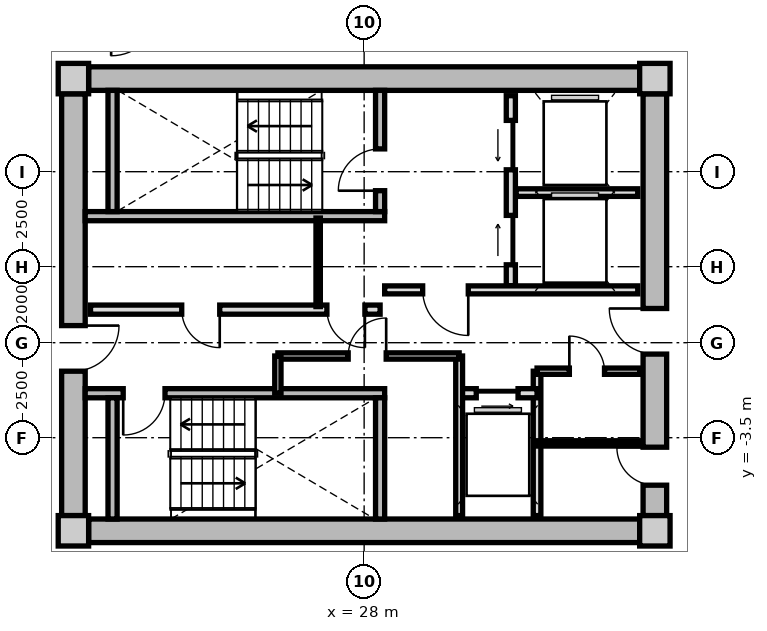
"""IFC4 building model, lengths in metres.
Left out: names, types, materials, properties, quantities, classifications, styles, units other than length and angle.
Written with IfcOpenShell. Run it as: python <this file> out.ifc"""

import sys

from ifc_helpers import new_model, si_unit, direction, frame, frame_2d, origin, origin_2d, place, context, subcontext, project, spatial, rectangle, extrude, source, transform, mapped, element, fill, save


model = new_model("IFC4")
c1 = context("Model", 3, precision=1e-05, world=origin(), true_north=direction((0.0, 1.0)))
c2 = subcontext(c1, "Body", "Model", "MODEL_VIEW")
j1 = project(units=[si_unit("LENGTHUNIT", "METRE"), si_unit("PLANEANGLEUNIT", "RADIAN")], contexts=[c1])
p1 = place(None, origin())
s1 = spatial("IfcSite", under=j1, at=p1, CompositionType="ELEMENT")
p2 = place(p1, origin())
s2 = spatial("IfcBuilding", under=s1, at=p2, CompositionType="ELEMENT")
p3 = place(p2, frame((0.0, 0.0, 167.85)))
s3 = spatial("IfcBuildingStorey", under=s2, at=p3, CompositionType="ELEMENT", Elevation=167.85)
m1 = source(origin(), c2, "Body", "SweptSolid", [
    extrude(rectangle(XDim=0.8, YDim=0.8, at=origin_2d()), origin(), (0.0, 0.0, 1.0), 3.05),
])
for number, where, z_axis, x_axis in (
    (1, (20.35, -5.95, 0.0), (0.0, 0.0, 1.0), (1.0, 0.0, 0.0)),
    (2, (35.65, -5.95, 0.0), (0.0, 0.0, 1.0), (1.0, 0.0, 0.0)),
    (3, (35.65, 5.95, 0.0), (0.0, 0.0, 1.0), (1.0, 0.0, 0.0)),
    (4, (20.35, 5.95, 0.0), (0.0, 0.0, 1.0), (1.0, 0.0, 0.0)),
):
    element("IfcColumn", number, at=place(p3, frame(where, z_axis=z_axis, x_axis=x_axis)), inside=s3, PredefinedType="COLUMN", context=c2, shape_type="MappedRepresentation", body=[
        mapped(m1, transform((0.0, 0.0, 0.0), x_axis=(1.0, 0.0, 0.0), y_axis=(0.0, 1.0, 0.0), z_axis=(0.0, 0.0, 1.0), scale=1.0)),
    ])
m2 = source(origin(), c2, "Body", "SweptSolid", [
    extrude(rectangle(XDim=14.5, YDim=0.62, at=frame_2d((7.25, 0.0))), origin(), (0.0, 0.0, 1.0), 2.81),
])
for number, where, z_axis, x_axis in (
    (5, (20.75, 5.95, 0.0), (0.0, 0.0, 1.0), (1.0, 0.0, 0.0)),
    (6, (35.25, -5.95, 0.0), (0.0, 0.0, 1.0), (-1.0, 0.0, 0.0)),
):
    element("IfcWall", number, at=place(p3, frame(where, z_axis=z_axis, x_axis=x_axis)), inside=s3, PredefinedType="SHEAR", context=c2, shape_type="MappedRepresentation", body=[
        mapped(m2, transform((0.0, 0.0, 0.0), x_axis=(1.0, 0.0, 0.0), y_axis=(0.0, 1.0, 0.0), z_axis=(0.0, 0.0, 1.0), scale=1.0)),
    ])
m3 = source(origin(), c2, "Body", "SweptSolid", [
    extrude(rectangle(XDim=11.1, YDim=0.62, at=frame_2d((5.55, 0.0))), origin(), (0.0, 0.0, 1.0), 2.81),
])
p4 = place(p3, frame((20.35, -5.55, 0.0), z_axis=(0.0, 0.0, 1.0), x_axis=(0.0, 1.0, 0.0)))
e7 = element("IfcWall", 7, at=p4, inside=s3, PredefinedType="SHEAR", context=c2, shape_type="MappedRepresentation", body=[
    mapped(m3, transform((0.0, 0.0, 0.0), x_axis=(1.0, 0.0, 0.0), y_axis=(0.0, 1.0, 0.0), z_axis=(0.0, 0.0, 1.0), scale=1.0)),
])
p5 = place(p4, frame((3.8, 0.0, 0.0)))
e8 = element("IfcOpeningElement", 8, at=p5, cuts=e7, PredefinedType="OPENING", context=c2, shape_type="SweptSolid", body=[
    extrude(rectangle(XDim=1.2, YDim=2.15, at=frame_2d((0.6, 1.075))), frame((0.0, 0.32, 0.0), z_axis=(0.0, -1.0, 0.0), x_axis=(1.0, 0.0, 0.0)), (0.0, 0.0, 1.0), 0.64),
])
p6 = place(p3, frame((35.65, 5.55, 0.0), z_axis=(0.0, 0.0, 1.0), x_axis=(0.0, -1.0, 0.0)))
e9 = element("IfcWall", 9, at=p6, inside=s3, PredefinedType="SHEAR", context=c2, shape_type="MappedRepresentation", body=[
    mapped(m3, transform((0.0, 0.0, 0.0), x_axis=(1.0, 0.0, 0.0), y_axis=(0.0, 1.0, 0.0), z_axis=(0.0, 0.0, 1.0), scale=1.0)),
])
p7 = place(p6, frame((5.65, 0.0, 0.0)))
e10 = element("IfcOpeningElement", 10, at=p7, cuts=e9, PredefinedType="OPENING", context=c2, shape_type="SweptSolid", body=[
    extrude(rectangle(XDim=1.2, YDim=2.15, at=frame_2d((0.6, 1.075))), frame((0.0, 0.32, 0.0), z_axis=(0.0, -1.0, 0.0), x_axis=(1.0, 0.0, 0.0)), (0.0, 0.0, 1.0), 0.64),
])
p8 = place(p6, frame((9.3, 0.0, 0.0)))
e11 = element("IfcOpeningElement", 11, at=p8, cuts=e9, PredefinedType="OPENING", context=c2, shape_type="SweptSolid", body=[
    extrude(rectangle(XDim=1.0, YDim=2.1, at=frame_2d((0.5, 1.05))), frame((0.0, 0.32, 0.0), z_axis=(0.0, -1.0, 0.0), x_axis=(1.0, 0.0, 0.0)), (0.0, 0.0, 1.0), 0.64),
])
m4 = source(origin(), c2, "Body", "SweptSolid", [
    extrude(rectangle(XDim=7.88, YDim=0.24, at=frame_2d((3.94, 0.0))), origin(), (0.0, 0.0, 1.0), 2.81),
])
p9 = place(p3, frame((20.66, 2.33, 0.0), z_axis=(0.0, 0.0, 1.0), x_axis=(1.0, 0.0, 0.0)))
e12 = element("IfcWall", 12, at=p9, inside=s3, PredefinedType="PARTITIONING", context=c2, shape_type="MappedRepresentation", body=[
    mapped(m4, transform((0.0, 0.0, 0.0), x_axis=(1.0, 0.0, 0.0), y_axis=(0.0, 1.0, 0.0), z_axis=(0.0, 0.0, 1.0), scale=1.0)),
])
m5 = source(origin(), c2, "Body", "SweptSolid", [
    extrude(rectangle(XDim=3.19, YDim=0.24, at=frame_2d((1.595, 0.0))), origin(), (0.0, 0.0, 1.0), 2.81),
])
p10 = place(p3, frame((21.38, 2.45, 0.0), z_axis=(0.0, 0.0, 1.0), x_axis=(0.0, 1.0, 0.0)))
e13 = element("IfcWall", 13, at=p10, inside=s3, PredefinedType="PARTITIONING", context=c2, shape_type="MappedRepresentation", body=[
    mapped(m5, transform((0.0, 0.0, 0.0), x_axis=(1.0, 0.0, 0.0), y_axis=(0.0, 1.0, 0.0), z_axis=(0.0, 0.0, 1.0), scale=1.0)),
])
p11 = place(p3, frame((28.42, 2.45, 0.0), z_axis=(0.0, 0.0, 1.0), x_axis=(0.0, 1.0, 0.0)))
e14 = element("IfcWall", 14, at=p11, inside=s3, PredefinedType="PARTITIONING", context=c2, shape_type="MappedRepresentation", body=[
    mapped(m5, transform((0.0, 0.0, 0.0), x_axis=(1.0, 0.0, 0.0), y_axis=(0.0, 1.0, 0.0), z_axis=(0.0, 0.0, 1.0), scale=1.0)),
])
p12 = place(p11, frame((0.55, 0.0, 0.0)))
e15 = element("IfcOpeningElement", 15, at=p12, cuts=e14, PredefinedType="OPENING", context=c2, shape_type="SweptSolid", body=[
    extrude(rectangle(XDim=1.1, YDim=2.15, at=frame_2d((0.55, 1.075))), frame((0.0, 0.13, 0.0), z_axis=(0.0, -1.0, 0.0), x_axis=(1.0, 0.0, 0.0)), (0.0, 0.0, 1.0), 0.26),
])
p13 = place(p3, frame((20.66, -2.33, 0.0), z_axis=(0.0, 0.0, 1.0), x_axis=(1.0, 0.0, 0.0)))
e16 = element("IfcWall", 16, at=p13, inside=s3, PredefinedType="PARTITIONING", context=c2, shape_type="MappedRepresentation", body=[
    mapped(m4, transform((0.0, 0.0, 0.0), x_axis=(1.0, 0.0, 0.0), y_axis=(0.0, 1.0, 0.0), z_axis=(0.0, 0.0, 1.0), scale=1.0)),
])
p14 = place(p13, frame((1.0, 0.0, 0.0)))
e17 = element("IfcOpeningElement", 17, at=p14, cuts=e16, PredefinedType="OPENING", context=c2, shape_type="SweptSolid", body=[
    extrude(rectangle(XDim=1.1, YDim=2.15, at=frame_2d((0.55, 1.075))), frame((0.0, 0.13, 0.0), z_axis=(0.0, -1.0, 0.0), x_axis=(1.0, 0.0, 0.0)), (0.0, 0.0, 1.0), 0.26),
])
for number, where, z_axis, x_axis in (
    (18, (21.38, -5.64, 0.0), (0.0, 0.0, 1.0), (0.0, 1.0, 0.0)),
    (19, (28.42, -5.64, 0.0), (0.0, 0.0, 1.0), (0.0, 1.0, 0.0)),
):
    element("IfcWall", number, at=place(p3, frame(where, z_axis=z_axis, x_axis=x_axis)), inside=s3, PredefinedType="PARTITIONING", context=c2, shape_type="MappedRepresentation", body=[
        mapped(m5, transform((0.0, 0.0, 0.0), x_axis=(1.0, 0.0, 0.0), y_axis=(0.0, 1.0, 0.0), z_axis=(0.0, 0.0, 1.0), scale=1.0)),
    ])
m6 = source(origin(), c2, "Body", "SweptSolid", [
    extrude(rectangle(XDim=5.0, YDim=0.24, at=frame_2d((2.5, 0.0))), origin(), (0.0, 0.0, 1.0), 2.795),
])
p15 = place(p3, frame((31.86, 0.5, 0.0), z_axis=(0.0, 0.0, 1.0), x_axis=(0.0, 1.0, 0.0)))
e20 = element("IfcWall", 20, at=p15, inside=s3, PredefinedType="PARTITIONING", context=c2, shape_type="MappedRepresentation", body=[
    mapped(m6, transform((0.0, 0.0, 0.0), x_axis=(1.0, 0.0, 0.0), y_axis=(0.0, 1.0, 0.0), z_axis=(0.0, 0.0, 1.0), scale=1.0)),
])
p16 = place(p15, frame((3.05, 0.0, 0.0)))
e21 = element("IfcOpeningElement", 21, at=p16, cuts=e20, PredefinedType="OPENING", context=c2, shape_type="SweptSolid", body=[
    extrude(rectangle(XDim=1.3, YDim=2.2, at=frame_2d((0.65, 1.1))), frame((0.0, 0.13, 0.0), z_axis=(0.0, -1.0, 0.0), x_axis=(1.0, 0.0, 0.0)), (0.0, 0.0, 1.0), 0.26),
])
p17 = place(p15, frame((0.55, 0.0, 0.0)))
e22 = element("IfcOpeningElement", 22, at=p17, cuts=e20, PredefinedType="OPENING", context=c2, shape_type="SweptSolid", body=[
    extrude(rectangle(XDim=1.3, YDim=2.2, at=frame_2d((0.65, 1.1))), frame((0.0, 0.13, 0.0), z_axis=(0.0, -1.0, 0.0), x_axis=(1.0, 0.0, 0.0)), (0.0, 0.0, 1.0), 0.26),
])
m7 = source(origin(), c2, "Body", "SweptSolid", [
    extrude(rectangle(XDim=3.2, YDim=0.2, at=frame_2d((1.6, 0.0))), origin(), (0.0, 0.0, 1.0), 2.795),
])
p18 = place(p3, frame((32.0, 2.95, 0.0), z_axis=(0.0, 0.0, 1.0), x_axis=(1.0, 0.0, 0.0)))
e23 = element("IfcWall", 23, at=p18, inside=s3, PredefinedType="PARTITIONING", context=c2, shape_type="MappedRepresentation", body=[
    mapped(m7, transform((0.0, 0.0, 0.0), x_axis=(1.0, 0.0, 0.0), y_axis=(0.0, 1.0, 0.0), z_axis=(0.0, 0.0, 1.0), scale=1.0)),
])
m8 = source(origin(), c2, "Body", "SweptSolid", [
    extrude(rectangle(XDim=6.66, YDim=0.21, at=frame_2d((3.33, 0.0))), origin(), (0.0, 0.0, 1.0), 2.795),
])
p19 = place(p3, frame((28.54, 0.39, 0.0), z_axis=(0.0, 0.0, 1.0), x_axis=(1.0, 0.0, 0.0)))
e24 = element("IfcWall", 24, at=p19, inside=s3, PredefinedType="PARTITIONING", context=c2, shape_type="MappedRepresentation", body=[
    mapped(m8, transform((0.0, 0.0, 0.0), x_axis=(1.0, 0.0, 0.0), y_axis=(0.0, 1.0, 0.0), z_axis=(0.0, 0.0, 1.0), scale=1.0)),
])
p20 = place(p19, frame((1.0, 0.0, 0.0)))
e25 = element("IfcOpeningElement", 25, at=p20, cuts=e24, PredefinedType="OPENING", context=c2, shape_type="SweptSolid", body=[
    extrude(rectangle(XDim=1.2, YDim=2.15, at=frame_2d((0.6, 1.075))), frame((0.0, 0.115, 0.0), z_axis=(0.0, -1.0, 0.0), x_axis=(1.0, 0.0, 0.0)), (0.0, 0.0, 1.0), 0.23),
])
m9 = source(origin(), c2, "Body", "SweptSolid", [
    extrude(rectangle(XDim=7.62, YDim=0.24, at=frame_2d((3.81, 0.0))), origin(), (0.0, 0.0, 1.0), 2.795),
])
p21 = place(p3, frame((20.8, -0.13, 0.0), z_axis=(0.0, 0.0, 1.0), x_axis=(1.0, 0.0, 0.0)))
e26 = element("IfcWall", 26, at=p21, inside=s3, PredefinedType="PARTITIONING", context=c2, shape_type="MappedRepresentation", body=[
    mapped(m9, transform((0.0, 0.0, 0.0), x_axis=(1.0, 0.0, 0.0), y_axis=(0.0, 1.0, 0.0), z_axis=(0.0, 0.0, 1.0), scale=1.0)),
])
p22 = place(p21, frame((6.22, 0.0, 0.0)))
e27 = element("IfcOpeningElement", 27, at=p22, cuts=e26, PredefinedType="OPENING", context=c2, shape_type="SweptSolid", body=[
    extrude(rectangle(XDim=1.0, YDim=2.1, at=frame_2d((0.5, 1.05))), frame((0.0, 0.13, 0.0), z_axis=(0.0, -1.0, 0.0), x_axis=(1.0, 0.0, 0.0)), (0.0, 0.0, 1.0), 0.26),
])
p23 = place(p21, frame((2.4, 0.0, 0.0)))
e28 = element("IfcOpeningElement", 28, at=p23, cuts=e26, PredefinedType="OPENING", context=c2, shape_type="SweptSolid", body=[
    extrude(rectangle(XDim=1.0, YDim=2.1, at=frame_2d((0.5, 1.05))), frame((0.0, 0.13, 0.0), z_axis=(0.0, -1.0, 0.0), x_axis=(1.0, 0.0, 0.0)), (0.0, 0.0, 1.0), 0.26),
])
m10 = source(origin(), c2, "Body", "SweptSolid", [
    extrude(rectangle(XDim=2.33, YDim=0.115, at=frame_2d((1.165, 0.0))), origin(), (0.0, 0.0, 1.0), 2.795),
])
p24 = place(p3, frame((26.79, -0.05, 0.0), z_axis=(0.0, 0.0, 1.0), x_axis=(0.0, 1.0, 0.0)))
e29 = element("IfcWall", 29, at=p24, inside=s3, PredefinedType="PARTITIONING", context=c2, shape_type="MappedRepresentation", body=[
    mapped(m10, transform((0.0, 0.0, 0.0), x_axis=(1.0, 0.0, 0.0), y_axis=(0.0, 1.0, 0.0), z_axis=(0.0, 0.0, 1.0), scale=1.0)),
])
m11 = source(origin(), c2, "Body", "SweptSolid", [
    extrude(rectangle(XDim=3.8, YDim=0.2, at=frame_2d((1.9, 0.0))), origin(), (0.0, 0.0, 1.0), 2.795),
])
p25 = place(p3, frame((32.55, -5.55, 0.0), z_axis=(0.0, 0.0, 1.0), x_axis=(0.0, 1.0, 0.0)))
e30 = element("IfcWall", 30, at=p25, inside=s3, PredefinedType="PARTITIONING", context=c2, shape_type="MappedRepresentation", body=[
    mapped(m11, transform((0.0, 0.0, 0.0), x_axis=(1.0, 0.0, 0.0), y_axis=(0.0, 1.0, 0.0), z_axis=(0.0, 0.0, 1.0), scale=1.0)),
])
m12 = source(origin(), c2, "Body", "SweptSolid", [
    extrude(rectangle(XDim=2.05, YDim=0.24, at=frame_2d((1.025, 0.0))), origin(), (0.0, 0.0, 1.0), 2.795),
])
p26 = place(p3, frame((30.5, -2.33, 0.0), z_axis=(0.0, 0.0, 1.0), x_axis=(1.0, 0.0, 0.0)))
e31 = element("IfcWall", 31, at=p26, inside=s3, PredefinedType="PARTITIONING", context=c2, shape_type="MappedRepresentation", body=[
    mapped(m12, transform((0.0, 0.0, 0.0), x_axis=(1.0, 0.0, 0.0), y_axis=(0.0, 1.0, 0.0), z_axis=(0.0, 0.0, 1.0), scale=1.0)),
])
p27 = place(p26, frame((0.45, 0.0, 0.0)))
e32 = element("IfcOpeningElement", 32, at=p27, cuts=e31, PredefinedType="OPENING", context=c2, shape_type="SweptSolid", body=[
    extrude(rectangle(XDim=1.1, YDim=2.2, at=frame_2d((0.55, 1.1))), frame((0.0, 0.13, 0.0), z_axis=(0.0, -1.0, 0.0), x_axis=(1.0, 0.0, 0.0)), (0.0, 0.0, 1.0), 0.26),
])
m13 = source(origin(), c2, "Body", "SweptSolid", [
    extrude(rectangle(XDim=4.2, YDim=0.18, at=frame_2d((2.1, 0.0))), origin(), (0.0, 0.0, 1.0), 2.795),
])
p28 = place(p3, frame((30.5, -5.55, 0.0), z_axis=(0.0, 0.0, 1.0), x_axis=(0.0, 1.0, 0.0)))
e33 = element("IfcWall", 33, at=p28, inside=s3, PredefinedType="PARTITIONING", context=c2, shape_type="MappedRepresentation", body=[
    mapped(m13, transform((0.0, 0.0, 0.0), x_axis=(1.0, 0.0, 0.0), y_axis=(0.0, 1.0, 0.0), z_axis=(0.0, 0.0, 1.0), scale=1.0)),
])
m14 = source(origin(), c2, "Body", "SweptSolid", [
    extrude(rectangle(XDim=4.77, YDim=0.165, at=frame_2d((2.385, 0.0))), origin(), (0.0, 0.0, 1.0), 2.795),
])
p29 = place(p3, frame((25.73, -1.35, 0.0), z_axis=(0.0, 0.0, 1.0), x_axis=(1.0, 0.0, 0.0)))
e34 = element("IfcWall", 34, at=p29, inside=s3, PredefinedType="PARTITIONING", context=c2, shape_type="MappedRepresentation", body=[
    mapped(m14, transform((0.0, 0.0, 0.0), x_axis=(1.0, 0.0, 0.0), y_axis=(0.0, 1.0, 0.0), z_axis=(0.0, 0.0, 1.0), scale=1.0)),
])
p30 = place(p29, frame((1.85, 0.0, 0.0)))
e35 = element("IfcOpeningElement", 35, at=p30, cuts=e34, PredefinedType="OPENING", context=c2, shape_type="SweptSolid", body=[
    extrude(rectangle(XDim=1.0, YDim=2.1, at=frame_2d((0.5, 1.05))), frame((0.0, 0.093, 0.0), z_axis=(0.0, -1.0, 0.0), x_axis=(1.0, 0.0, 0.0)), (0.0, 0.0, 1.0), 0.185),
])
m15 = source(origin(), c2, "Body", "SweptSolid", [
    extrude(rectangle(XDim=0.98, YDim=0.165, at=frame_2d((0.49, 0.0))), origin(), (0.0, 0.0, 1.0), 2.795),
])
p31 = place(p3, frame((25.73, -2.33, 0.0), z_axis=(0.0, 0.0, 1.0), x_axis=(0.0, 1.0, 0.0)))
e36 = element("IfcWall", 36, at=p31, inside=s3, PredefinedType="PARTITIONING", context=c2, shape_type="MappedRepresentation", body=[
    mapped(m15, transform((0.0, 0.0, 0.0), x_axis=(1.0, 0.0, 0.0), y_axis=(0.0, 1.0, 0.0), z_axis=(0.0, 0.0, 1.0), scale=1.0)),
])
m16 = source(origin(), c2, "Body", "SweptSolid", [
    extrude(rectangle(XDim=2.7, YDim=0.165, at=frame_2d((1.35, 0.0))), origin(), (0.0, 0.0, 1.0), 2.795),
])
p32 = place(p3, frame((32.55, -1.75, 0.0), z_axis=(0.0, 0.0, 1.0), x_axis=(1.0, 0.0, 0.0)))
e37 = element("IfcWall", 37, at=p32, inside=s3, PredefinedType="PARTITIONING", context=c2, shape_type="MappedRepresentation", body=[
    mapped(m16, transform((0.0, 0.0, 0.0), x_axis=(1.0, 0.0, 0.0), y_axis=(0.0, 1.0, 0.0), z_axis=(0.0, 0.0, 1.0), scale=1.0)),
])
p33 = place(p32, frame((0.85, 0.0, 0.0)))
e38 = element("IfcOpeningElement", 38, at=p33, cuts=e37, PredefinedType="OPENING", context=c2, shape_type="SweptSolid", body=[
    extrude(rectangle(XDim=0.925, YDim=2.1, at=frame_2d((0.462, 1.05))), frame((0.0, 0.093, 0.0), z_axis=(0.0, -1.0, 0.0), x_axis=(1.0, 0.0, 0.0)), (0.0, 0.0, 1.0), 0.185),
])
m17 = source(origin(), c2, "Body", "SweptSolid", [
    extrude(rectangle(XDim=2.7, YDim=0.14, at=frame_2d((1.35, 0.0))), origin(), (0.0, 0.0, 1.0), 2.795),
])
p34 = place(p3, frame((32.55, -3.65, 0.0), z_axis=(0.0, 0.0, 1.0), x_axis=(1.0, 0.0, 0.0)))
e39 = element("IfcWall", 39, at=p34, inside=s3, PredefinedType="PARTITIONING", context=c2, shape_type="MappedRepresentation", body=[
    mapped(m17, transform((0.0, 0.0, 0.0), x_axis=(1.0, 0.0, 0.0), y_axis=(0.0, 1.0, 0.0), z_axis=(0.0, 0.0, 1.0), scale=1.0)),
])
m18 = source(origin(), c2, "Body", "SweptSolid", [
    extrude(rectangle(XDim=1.1, YDim=2.15, at=frame_2d((0.55, 1.075))), frame((0.0, 0.025, 0.0), z_axis=(0.0, -1.0, 0.0), x_axis=(1.0, 0.0, 0.0)), (0.0, 0.0, 1.0), 0.05),
])
p35 = place(p12, origin())
e40 = element("IfcDoor", 40, at=p35, inside=s3, OperationType="SINGLE_SWING_LEFT", PredefinedType="DOOR", context=c2, shape_type="MappedRepresentation", body=[
    mapped(m18, transform((0.0, 0.0, 0.0), x_axis=(1.0, 0.0, 0.0), y_axis=(0.0, 1.0, 0.0), z_axis=(0.0, 0.0, 1.0), scale=1.0)),
])
fill(e15, e40)
p36 = place(p14, frame((1.1, 0.0, 0.0), z_axis=(0.0, 0.0, 1.0), x_axis=(-1.0, 0.0, 0.0)))
e41 = element("IfcDoor", 41, at=p36, inside=s3, OperationType="SINGLE_SWING_RIGHT", PredefinedType="DOOR", context=c2, shape_type="MappedRepresentation", body=[
    mapped(m18, transform((0.0, 0.0, 0.0), x_axis=(1.0, 0.0, 0.0), y_axis=(0.0, 1.0, 0.0), z_axis=(0.0, 0.0, 1.0), scale=1.0)),
])
fill(e17, e41)
m19 = source(origin(), c2, "Body", "SweptSolid", [
    extrude(rectangle(XDim=1.3, YDim=2.2, at=frame_2d((0.65, 1.1))), frame((0.0, 0.025, 0.0), z_axis=(0.0, -1.0, 0.0), x_axis=(1.0, 0.0, 0.0)), (0.0, 0.0, 1.0), 0.05),
])
p37 = place(p16, origin())
e42 = element("IfcDoor", 42, at=p37, inside=s3, OperationType="SLIDING_TO_LEFT", PredefinedType="DOOR", context=c2, shape_type="MappedRepresentation", body=[
    mapped(m19, transform((0.0, 0.0, 0.0), x_axis=(1.0, 0.0, 0.0), y_axis=(0.0, 1.0, 0.0), z_axis=(0.0, 0.0, 1.0), scale=1.0)),
])
fill(e21, e42)
p38 = place(p17, origin())
e43 = element("IfcDoor", 43, at=p38, inside=s3, OperationType="SLIDING_TO_RIGHT", PredefinedType="DOOR", context=c2, shape_type="MappedRepresentation", body=[
    mapped(m19, transform((0.0, 0.0, 0.0), x_axis=(1.0, 0.0, 0.0), y_axis=(0.0, 1.0, 0.0), z_axis=(0.0, 0.0, 1.0), scale=1.0)),
])
fill(e22, e43)
m20 = source(origin(), c2, "Body", "SweptSolid", [
    extrude(rectangle(XDim=1.2, YDim=2.15, at=frame_2d((0.6, 1.075))), frame((0.0, 0.025, 0.0), z_axis=(0.0, -1.0, 0.0), x_axis=(1.0, 0.0, 0.0)), (0.0, 0.0, 1.0), 0.05),
])
p39 = place(p20, frame((1.2, 0.0, 0.0), z_axis=(0.0, 0.0, 1.0), x_axis=(-1.0, 0.0, 0.0)))
e44 = element("IfcDoor", 44, at=p39, inside=s3, OperationType="SINGLE_SWING_LEFT", PredefinedType="DOOR", context=c2, shape_type="MappedRepresentation", body=[
    mapped(m20, transform((0.0, 0.0, 0.0), x_axis=(1.0, 0.0, 0.0), y_axis=(0.0, 1.0, 0.0), z_axis=(0.0, 0.0, 1.0), scale=1.0)),
])
fill(e25, e44)
p40 = place(p5, frame((1.2, 0.0, 0.0), z_axis=(0.0, 0.0, 1.0), x_axis=(-1.0, 0.0, 0.0)))
e45 = element("IfcDoor", 45, at=p40, inside=s3, OperationType="SINGLE_SWING_LEFT", PredefinedType="DOOR", context=c2, shape_type="MappedRepresentation", body=[
    mapped(m20, transform((0.0, 0.0, 0.0), x_axis=(1.0, 0.0, 0.0), y_axis=(0.0, 1.0, 0.0), z_axis=(0.0, 0.0, 1.0), scale=1.0)),
])
fill(e8, e45)
p41 = place(p7, frame((1.2, 0.0, 0.0), z_axis=(0.0, 0.0, 1.0), x_axis=(-1.0, 0.0, 0.0)))
e46 = element("IfcDoor", 46, at=p41, inside=s3, OperationType="SINGLE_SWING_RIGHT", PredefinedType="DOOR", context=c2, shape_type="MappedRepresentation", body=[
    mapped(m20, transform((0.0, 0.0, 0.0), x_axis=(1.0, 0.0, 0.0), y_axis=(0.0, 1.0, 0.0), z_axis=(0.0, 0.0, 1.0), scale=1.0)),
])
fill(e10, e46)
m21 = source(origin(), c2, "Body", "SweptSolid", [
    extrude(rectangle(XDim=1.0, YDim=2.1, at=frame_2d((0.5, 1.05))), frame((0.0, 0.025, 0.0), z_axis=(0.0, -1.0, 0.0), x_axis=(1.0, 0.0, 0.0)), (0.0, 0.0, 1.0), 0.05),
])
p42 = place(p22, frame((1.0, 0.0, 0.0), z_axis=(0.0, 0.0, 1.0), x_axis=(-1.0, 0.0, 0.0)))
e47 = element("IfcDoor", 47, at=p42, inside=s3, OperationType="SINGLE_SWING_LEFT", PredefinedType="DOOR", context=c2, shape_type="MappedRepresentation", body=[
    mapped(m21, transform((0.0, 0.0, 0.0), x_axis=(1.0, 0.0, 0.0), y_axis=(0.0, 1.0, 0.0), z_axis=(0.0, 0.0, 1.0), scale=1.0)),
])
fill(e27, e47)
p43 = place(p23, frame((1.0, 0.0, 0.0), z_axis=(0.0, 0.0, 1.0), x_axis=(-1.0, 0.0, 0.0)))
e48 = element("IfcDoor", 48, at=p43, inside=s3, OperationType="SINGLE_SWING_LEFT", PredefinedType="DOOR", context=c2, shape_type="MappedRepresentation", body=[
    mapped(m21, transform((0.0, 0.0, 0.0), x_axis=(1.0, 0.0, 0.0), y_axis=(0.0, 1.0, 0.0), z_axis=(0.0, 0.0, 1.0), scale=1.0)),
])
fill(e28, e48)
m22 = source(origin(), c2, "Body", "SweptSolid", [
    extrude(rectangle(XDim=1.1, YDim=2.2, at=frame_2d((0.55, 1.1))), frame((0.0, 0.025, 0.0), z_axis=(0.0, -1.0, 0.0), x_axis=(1.0, 0.0, 0.0)), (0.0, 0.0, 1.0), 0.05),
])
p44 = place(p27, frame((1.1, 0.0, 0.0), z_axis=(0.0, 0.0, 1.0), x_axis=(-1.0, 0.0, 0.0)))
e49 = element("IfcDoor", 49, at=p44, inside=s3, OperationType="SLIDING_TO_RIGHT", PredefinedType="DOOR", context=c2, shape_type="MappedRepresentation", body=[
    mapped(m22, transform((0.0, 0.0, 0.0), x_axis=(1.0, 0.0, 0.0), y_axis=(0.0, 1.0, 0.0), z_axis=(0.0, 0.0, 1.0), scale=1.0)),
])
fill(e32, e49)
p45 = place(p30, origin())
e50 = element("IfcDoor", 50, at=p45, inside=s3, OperationType="SINGLE_SWING_RIGHT", PredefinedType="DOOR", context=c2, shape_type="MappedRepresentation", body=[
    mapped(m21, transform((0.0, 0.0, 0.0), x_axis=(1.0, 0.0, 0.0), y_axis=(0.0, 1.0, 0.0), z_axis=(0.0, 0.0, 1.0), scale=1.0)),
])
fill(e35, e50)
m23 = source(origin(), c2, "Body", "SweptSolid", [
    extrude(rectangle(XDim=0.925, YDim=2.1, at=frame_2d((0.462, 1.05))), frame((0.0, 0.025, 0.0), z_axis=(0.0, -1.0, 0.0), x_axis=(1.0, 0.0, 0.0)), (0.0, 0.0, 1.0), 0.05),
])
p46 = place(p33, origin())
e51 = element("IfcDoor", 51, at=p46, inside=s3, OperationType="SINGLE_SWING_LEFT", PredefinedType="DOOR", context=c2, shape_type="MappedRepresentation", body=[
    mapped(m23, transform((0.0, 0.0, 0.0), x_axis=(1.0, 0.0, 0.0), y_axis=(0.0, 1.0, 0.0), z_axis=(0.0, 0.0, 1.0), scale=1.0)),
])
fill(e38, e51)
p47 = place(p8, frame((1.0, 0.0, 0.0), z_axis=(0.0, 0.0, 1.0), x_axis=(-1.0, 0.0, 0.0)))
e52 = element("IfcDoor", 52, at=p47, inside=s3, OperationType="SINGLE_SWING_RIGHT", PredefinedType="DOOR", context=c2, shape_type="MappedRepresentation", body=[
    mapped(m21, transform((0.0, 0.0, 0.0), x_axis=(1.0, 0.0, 0.0), y_axis=(0.0, 1.0, 0.0), z_axis=(0.0, 0.0, 1.0), scale=1.0)),
])
fill(e11, e52)
save(model, sys.argv[1])
